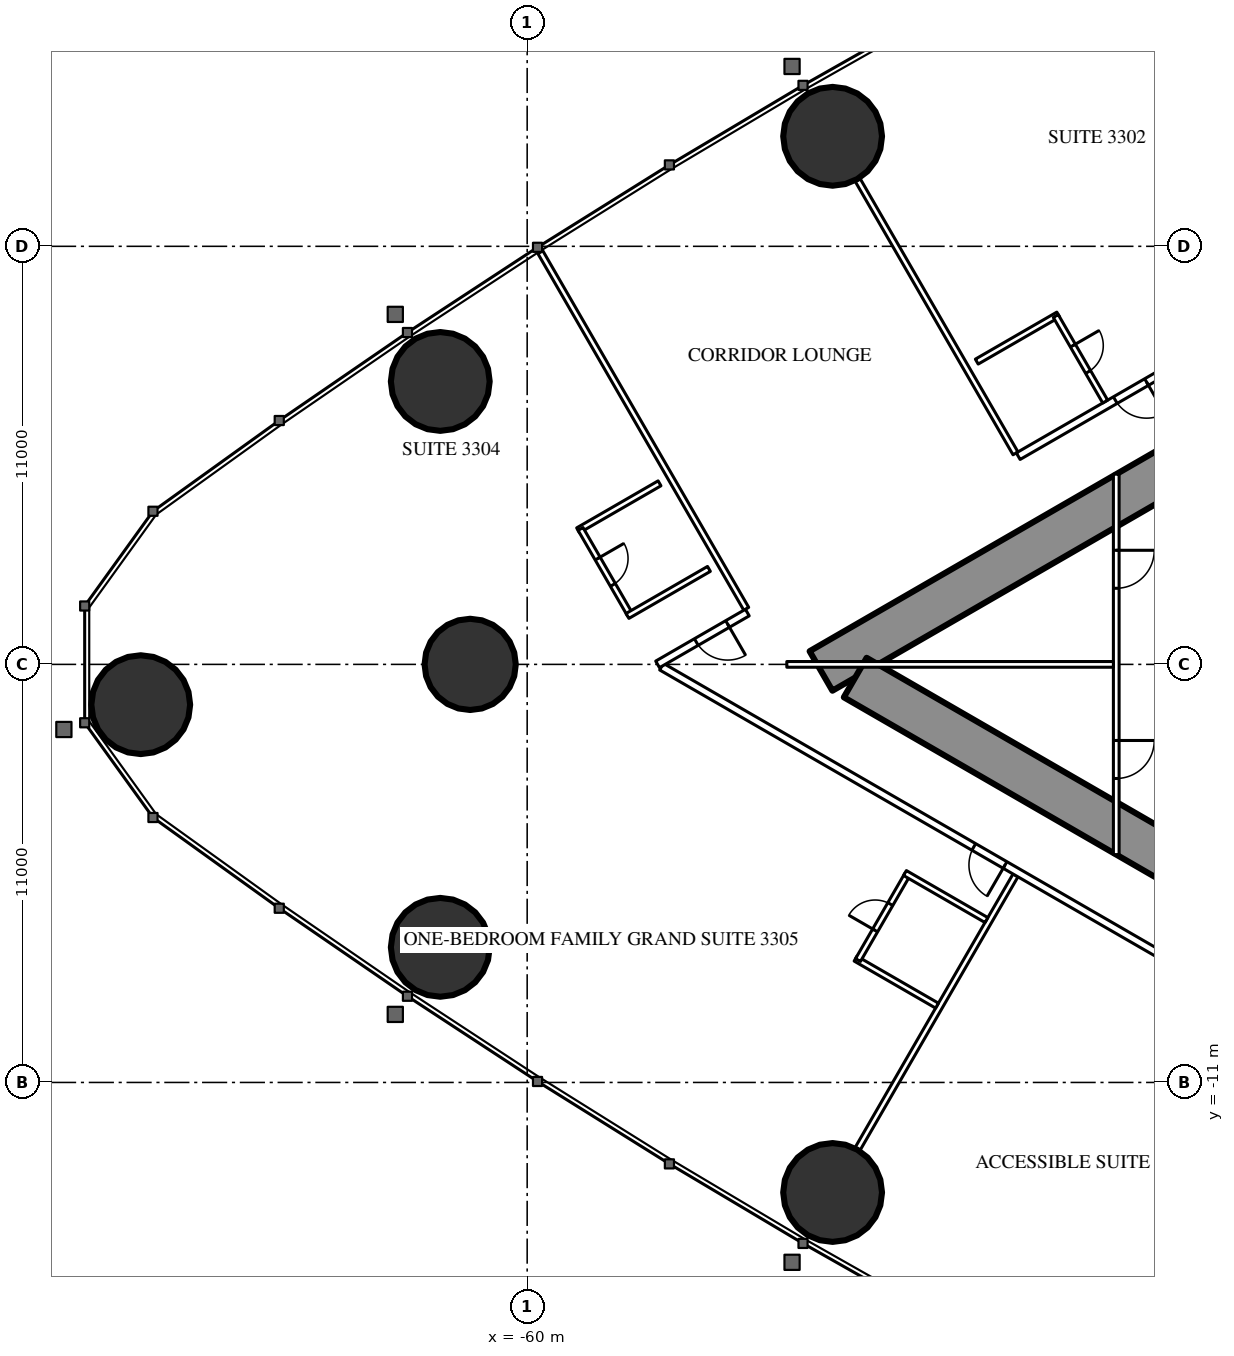
"""IFC4 building model, lengths in metres.
Left out: names, types, materials, properties, quantities, classifications, styles, units other than length and angle.
Written with IfcOpenShell. Run it as: python <this file> out.ifc"""

import sys

from ifc_helpers import new_model, si_unit, direction, frame, frame_2d, origin, origin_2d, place, context, subcontext, project, spatial, rectangle, circle, hollow_circle, extrude, element, fill, save


model = new_model("IFC4")
c1 = context("Model", 3, precision=1e-05, world=origin(), true_north=direction((0.0, 1.0)))
c2 = subcontext(c1, "Body", "Model", "MODEL_VIEW")
j1 = project(units=[si_unit("LENGTHUNIT", "METRE"), si_unit("PLANEANGLEUNIT", "RADIAN")], contexts=[c1])
p1 = place(None, origin())
s1 = spatial("IfcSite", under=j1, at=p1, CompositionType="ELEMENT")
p2 = place(p1, origin())
s2 = spatial("IfcBuilding", under=s1, at=p2, CompositionType="ELEMENT")
p3 = place(p2, frame((0.0, 0.0, 125.6)))
s3 = spatial("IfcBuildingStorey", under=s2, at=p3, CompositionType="ELEMENT", Elevation=125.6)
for number, where, z_axis, x_axis in (
    (1, (-70.168, -1.06, 0.0), (0.0, 0.0, 1.0), (1.0, 0.0, 0.0)),
    (2, (-62.287, -7.445, 0.0), (0.0, 0.0, 1.0), (1.0, 0.0, 0.0)),
    (3, (-51.963, -13.895, 0.0), (0.0, 0.0, 1.0), (1.0, 0.0, 0.0)),
    (4, (-51.963, 13.895, 0.0), (0.0, 0.0, 1.0), (1.0, 0.0, 0.0)),
    (5, (-62.287, 7.445, 0.0), (0.0, 0.0, 1.0), (1.0, 0.0, 0.0)),
):
    element("IfcColumn", number, at=place(p3, frame(where, z_axis=z_axis, x_axis=x_axis)), inside=s3, PredefinedType="COLUMN", context=c2, shape_type="SweptSolid", body=[
        extrude(hollow_circle(Radius=1.3, WallThickness=0.1, at=origin_2d()), origin(), (0.0, 0.0, 1.0), 3.5),
    ])
p4 = place(p3, frame((-61.5, 0.0, 0.0), z_axis=(0.0, 0.0, 1.0), x_axis=(1.0, 0.0, 0.0)))
e6 = element("IfcColumn", 6, at=p4, inside=s3, PredefinedType="COLUMN", context=c2, shape_type="SweptSolid", body=[
    extrude(circle(Radius=1.2, at=origin_2d()), origin(), (0.0, 0.0, 1.0), 3.5),
])
p5 = place(p3, frame((-27.2, 14.3, 0.0), z_axis=(0.0, 0.0, 1.0), x_axis=(-0.866026593062, -0.499997940104, 0.0)))
e7 = element("IfcWall", 7, at=p5, inside=s3, PredefinedType="SHEAR", context=c2, shape_type="SweptSolid", body=[
    extrude(rectangle(XDim=28.946, YDim=1.2, at=frame_2d((14.473, 0.0))), origin(), (0.0, 0.0, 1.0), 3.5),
])
p6 = place(p5, frame((4.6, 0.0, 0.0)))
e8 = element("IfcOpeningElement", 8, at=p6, cuts=e7, PredefinedType="OPENING", context=c2, shape_type="SweptSolid", body=[
    extrude(rectangle(XDim=1.0, YDim=2.2, at=frame_2d((0.5, 1.1))), frame((0.0, 0.61, 0.0), z_axis=(0.0, -1.0, 0.0), x_axis=(1.0, 0.0, 0.0)), (0.0, 0.0, 1.0), 1.22),
])
p7 = place(p5, frame((13.395, 0.0, 0.0)))
e9 = element("IfcOpeningElement", 9, at=p7, cuts=e7, PredefinedType="OPENING", context=c2, shape_type="SweptSolid", body=[
    extrude(rectangle(XDim=1.8, YDim=2.2, at=frame_2d((0.9, 1.1))), frame((0.0, 0.61, 0.0), z_axis=(0.0, -1.0, 0.0), x_axis=(1.0, 0.0, 0.0)), (0.0, 0.0, 1.0), 1.22),
])
p8 = place(p3, frame((-27.2, -14.3, 0.0), z_axis=(0.0, 0.0, 1.0), x_axis=(-0.866024021859, 0.500002393557, 0.0)))
e10 = element("IfcWall", 10, at=p8, inside=s3, PredefinedType="SHEAR", context=c2, shape_type="SweptSolid", body=[
    extrude(rectangle(XDim=27.907, YDim=1.2, at=frame_2d((13.954, 0.0))), origin(), (0.0, 0.0, 1.0), 3.5),
])
p9 = place(p8, frame((4.6, 0.0, 0.0)))
e11 = element("IfcOpeningElement", 11, at=p9, cuts=e10, PredefinedType="OPENING", context=c2, shape_type="SweptSolid", body=[
    extrude(rectangle(XDim=1.0, YDim=2.2, at=frame_2d((0.5, 1.1))), frame((0.0, 0.61, 0.0), z_axis=(0.0, -1.0, 0.0), x_axis=(1.0, 0.0, 0.0)), (0.0, 0.0, 1.0), 1.22),
])
p10 = place(p8, frame((13.395, 0.0, 0.0)))
e12 = element("IfcOpeningElement", 12, at=p10, cuts=e10, PredefinedType="OPENING", context=c2, shape_type="SweptSolid", body=[
    extrude(rectangle(XDim=1.8, YDim=2.2, at=frame_2d((0.9, 1.1))), frame((0.0, 0.61, 0.0), z_axis=(0.0, -1.0, 0.0), x_axis=(1.0, 0.0, 0.0)), (0.0, 0.0, 1.0), 1.22),
])
p11 = place(p3, frame((-47.151, 5.552, 0.0), z_axis=(0.0, 0.0, 1.0), x_axis=(-0.500003012045, 0.866023664773, 0.0)))
e13 = element("IfcWall", 13, at=p11, inside=s3, PredefinedType="PARTITIONING", context=c2, shape_type="SweptSolid", body=[
    extrude(rectangle(XDim=8.311, YDim=0.15, at=frame_2d((4.156, 0.0))), origin(), (0.0, 0.0, 1.0), 2.2),
])
p12 = place(p3, frame((-54.236, 1.462, 0.0), z_axis=(0.0, 0.0, 1.0), x_axis=(-0.499990351854, 0.866030974073, 0.0)))
e14 = element("IfcWall", 14, at=p12, inside=s3, PredefinedType="PARTITIONING", context=c2, shape_type="SweptSolid", body=[
    extrude(rectangle(XDim=10.834, YDim=0.15, at=frame_2d((5.417, 0.0))), origin(), (0.0, 0.0, 1.0), 3.25),
])
p13 = place(p3, frame((-47.151, -5.552, 0.0), z_axis=(0.0, 0.0, 1.0), x_axis=(-0.500003012045, -0.866023664773, 0.0)))
e15 = element("IfcWall", 15, at=p13, inside=s3, PredefinedType="PARTITIONING", context=c2, shape_type="SweptSolid", body=[
    extrude(rectangle(XDim=8.311, YDim=0.15, at=frame_2d((4.156, 0.0))), origin(), (0.0, 0.0, 1.0), 2.2),
])
p14 = place(p3, frame((-36.92, -11.344, 0.0), z_axis=(0.0, 0.0, 1.0), x_axis=(-0.866028313256, 0.499994960614, 0.0)))
e16 = element("IfcWall", 16, at=p14, inside=s3, PredefinedType="PARTITIONING", context=c2, shape_type="SweptSolid", body=[
    extrude(rectangle(XDim=22.568, YDim=0.2, at=frame_2d((11.284, 0.0))), origin(), (0.0, 0.0, 1.0), 3.25),
])
p15 = place(p14, frame((12.131, 0.0, 0.0)))
e17 = element("IfcOpeningElement", 17, at=p15, cuts=e16, PredefinedType="OPENING", context=c2, shape_type="SweptSolid", body=[
    extrude(rectangle(XDim=0.95, YDim=2.2, at=frame_2d((0.475, 1.1))), frame((0.0, 0.11, 0.0), z_axis=(0.0, -1.0, 0.0), x_axis=(1.0, 0.0, 0.0)), (0.0, 0.0, 1.0), 0.22),
])
p16 = place(p14, frame((3.35, 0.0, 0.0)))
e18 = element("IfcOpeningElement", 18, at=p16, cuts=e16, PredefinedType="OPENING", context=c2, shape_type="SweptSolid", body=[
    extrude(rectangle(XDim=1.0, YDim=2.2, at=frame_2d((0.5, 1.1))), frame((0.0, 0.11, 0.0), z_axis=(0.0, -1.0, 0.0), x_axis=(1.0, 0.0, 0.0)), (0.0, 0.0, 1.0), 0.22),
])
p17 = place(p3, frame((-37.7, 10.894, 0.0), z_axis=(0.0, 0.0, 1.0), x_axis=(-0.866027551079, -0.499996280759, 0.0)))
e19 = element("IfcWall", 19, at=p17, inside=s3, PredefinedType="PARTITIONING", context=c2, shape_type="SweptSolid", body=[
    extrude(rectangle(XDim=10.831, YDim=0.2, at=frame_2d((5.415, 0.0))), origin(), (0.0, 0.0, 1.0), 3.25),
])
p18 = place(p17, frame((6.93, 0.0, 0.0)))
e20 = element("IfcOpeningElement", 20, at=p18, cuts=e19, PredefinedType="OPENING", context=c2, shape_type="SweptSolid", body=[
    extrude(rectangle(XDim=0.95, YDim=2.2, at=frame_2d((0.475, 1.1))), frame((0.0, 0.11, 0.0), z_axis=(0.0, -1.0, 0.0), x_axis=(1.0, 0.0, 0.0)), (0.0, 0.0, 1.0), 0.22),
])
p19 = place(p3, frame((-54.207, 1.363, 0.0), z_axis=(0.0, 0.0, 1.0), x_axis=(-0.866046902845, -0.499962760685, 0.0)))
e21 = element("IfcWall", 21, at=p19, inside=s3, PredefinedType="PARTITIONING", context=c2, shape_type="SweptSolid", body=[
    extrude(rectangle(XDim=2.726, YDim=0.2, at=frame_2d((1.363, 0.0))), origin(), (0.0, 0.0, 1.0), 3.25),
])
p20 = place(p19, frame((0.6, 0.0, 0.0)))
e22 = element("IfcOpeningElement", 22, at=p20, cuts=e21, PredefinedType="OPENING", context=c2, shape_type="SweptSolid", body=[
    extrude(rectangle(XDim=0.95, YDim=2.2, at=frame_2d((0.475, 1.1))), frame((0.0, 0.11, 0.0), z_axis=(0.0, -1.0, 0.0), x_axis=(1.0, 0.0, 0.0)), (0.0, 0.0, 1.0), 0.22),
])
p21 = place(p3, frame((-56.517, 4.764, 0.0), z_axis=(0.0, 0.0, 1.0), x_axis=(-0.866031185235, -0.4999899861, 0.0)))
e23 = element("IfcWall", 23, at=p21, inside=s3, PredefinedType="PARTITIONING", context=c2, shape_type="SweptSolid", body=[
    extrude(rectangle(XDim=2.475, YDim=0.15, at=frame_2d((1.238, 0.0))), origin(), (0.0, 0.0, 1.0), 3.25),
])
p22 = place(p3, frame((-57.296, 1.312, 0.0), z_axis=(0.0, 0.0, 1.0), x_axis=(-0.49997716683, 0.86603858612, 0.0)))
e24 = element("IfcWall", 24, at=p22, inside=s3, PredefinedType="PARTITIONING", context=c2, shape_type="SweptSolid", body=[
    extrude(rectangle(XDim=2.6, YDim=0.15, at=frame_2d((1.3, 0.0))), origin(), (0.0, 0.0, 1.0), 3.25),
])
p23 = place(p22, frame((0.9, 0.0, 0.0)))
e25 = element("IfcOpeningElement", 25, at=p23, cuts=e24, PredefinedType="OPENING", context=c2, shape_type="SweptSolid", body=[
    extrude(rectangle(XDim=0.8, YDim=2.2, at=frame_2d((0.4, 1.1))), frame((0.0, 0.085, 0.0), z_axis=(0.0, -1.0, 0.0), x_axis=(1.0, 0.0, 0.0)), (0.0, 0.0, 1.0), 0.17),
])
for number, where, z_axis, x_axis in (
    (26, (-55.217, 2.512, 0.0), (0.0, 0.0, 1.0), (-0.866, -0.5, 0.0)),
    (27, (-49.216, -8.979, 0.0), (0.0, 0.0, 1.0), (-0.866, 0.5, 0.0)),
):
    element("IfcWall", number, at=place(p3, frame(where, z_axis=z_axis, x_axis=x_axis)), inside=s3, PredefinedType="PARTITIONING", context=c2, shape_type="SweptSolid", body=[
        extrude(rectangle(XDim=2.475, YDim=0.15, at=frame_2d((1.238, 0.0))), origin(), (0.0, 0.0, 1.0), 3.25),
    ])
p24 = place(p3, frame((-49.995, -5.527, 0.0), z_axis=(0.0, 0.0, 1.0), x_axis=(-0.500006934395, -0.866021400173, 0.0)))
e28 = element("IfcWall", 28, at=p24, inside=s3, PredefinedType="PARTITIONING", context=c2, shape_type="SweptSolid", body=[
    extrude(rectangle(XDim=2.6, YDim=0.15, at=frame_2d((1.3, 0.0))), origin(), (0.0, 0.0, 1.0), 3.25),
])
p25 = place(p24, frame((0.9, 0.0, 0.0)))
e29 = element("IfcOpeningElement", 29, at=p25, cuts=e28, PredefinedType="OPENING", context=c2, shape_type="SweptSolid", body=[
    extrude(rectangle(XDim=0.8, YDim=2.2, at=frame_2d((0.4, 1.1))), frame((0.0, 0.085, 0.0), z_axis=(0.0, -1.0, 0.0), x_axis=(1.0, 0.0, 0.0)), (0.0, 0.0, 1.0), 0.17),
])
p26 = place(p3, frame((-47.916, -6.727, 0.0), z_axis=(0.0, 0.0, 1.0), x_axis=(-0.866031185235, 0.4999899861, 0.0)))
e30 = element("IfcWall", 30, at=p26, inside=s3, PredefinedType="PARTITIONING", context=c2, shape_type="SweptSolid", body=[
    extrude(rectangle(XDim=2.475, YDim=0.15, at=frame_2d((1.238, 0.0))), origin(), (0.0, 0.0, 1.0), 3.25),
])
p27 = place(p3, frame((-46.026, 9.204, 0.0), z_axis=(0.0, 0.0, 1.0), x_axis=(-0.866006523861, -0.500032699561, 0.0)))
e31 = element("IfcWall", 31, at=p27, inside=s3, PredefinedType="PARTITIONING", context=c2, shape_type="SweptSolid", body=[
    extrude(rectangle(XDim=2.475, YDim=0.15, at=frame_2d((1.237, 0.0))), origin(), (0.0, 0.0, 1.0), 3.25),
])
p28 = place(p3, frame((-44.791, 6.915, 0.0), z_axis=(0.0, 0.0, 1.0), x_axis=(-0.500047596559, 0.865997922154, 0.0)))
e32 = element("IfcWall", 32, at=p28, inside=s3, PredefinedType="PARTITIONING", context=c2, shape_type="SweptSolid", body=[
    extrude(rectangle(XDim=2.6, YDim=0.15, at=frame_2d((1.3, 0.0))), origin(), (0.0, 0.0, 1.0), 3.25),
])
p29 = place(p28, frame((0.9, 0.0, 0.0)))
e33 = element("IfcOpeningElement", 33, at=p29, cuts=e32, PredefinedType="OPENING", context=c2, shape_type="SweptSolid", body=[
    extrude(rectangle(XDim=0.8, YDim=2.2, at=frame_2d((0.4, 1.1))), frame((0.0, 0.085, 0.0), z_axis=(0.0, -1.0, 0.0), x_axis=(1.0, 0.0, 0.0)), (0.0, 0.0, 1.0), 0.17),
])
p30 = place(p3, frame((-44.5, 5.005, 0.0), z_axis=(0.0, 0.0, 1.0), x_axis=(0.0, -1.0, 0.0)))
e34 = element("IfcWall", 34, at=p30, inside=s3, PredefinedType="PARTITIONING", context=c2, shape_type="SweptSolid", body=[
    extrude(rectangle(XDim=10.009, YDim=0.15, at=frame_2d((5.005, 0.0))), origin(), (0.0, 0.0, 1.0), 2.45),
])
p31 = place(p30, frame((2.002, 0.0, 0.0)))
e35 = element("IfcOpeningElement", 35, at=p31, cuts=e34, PredefinedType="OPENING", context=c2, shape_type="SweptSolid", body=[
    extrude(rectangle(XDim=1.0, YDim=2.2, at=frame_2d((0.5, 1.1))), frame((0.0, 0.085, 0.0), z_axis=(0.0, -1.0, 0.0), x_axis=(1.0, 0.0, 0.0)), (0.0, 0.0, 1.0), 0.17),
])
p32 = place(p30, frame((7.007, 0.0, 0.0)))
e36 = element("IfcOpeningElement", 36, at=p32, cuts=e34, PredefinedType="OPENING", context=c2, shape_type="SweptSolid", body=[
    extrude(rectangle(XDim=1.0, YDim=2.2, at=frame_2d((0.5, 1.1))), frame((0.0, 0.085, 0.0), z_axis=(0.0, -1.0, 0.0), x_axis=(1.0, 0.0, 0.0)), (0.0, 0.0, 1.0), 0.17),
])
p33 = place(p3, frame((-44.575, 0.0, 0.0), z_axis=(0.0, 0.0, 1.0), x_axis=(-1.0, 0.0, 0.0)))
e37 = element("IfcWall", 37, at=p33, inside=s3, PredefinedType="PARTITIONING", context=c2, shape_type="SweptSolid", body=[
    extrude(rectangle(XDim=8.593, YDim=0.15, at=frame_2d((4.297, 0.0))), origin(), (0.0, 0.0, 1.0), 2.2),
])
p34 = place(p23, origin())
e38 = element("IfcDoor", 38, at=p34, inside=s3, OperationType="SINGLE_SWING_RIGHT", PredefinedType="DOOR", context=c2, shape_type="SweptSolid", body=[
    extrude(rectangle(XDim=0.8, YDim=2.2, at=frame_2d((0.4, 1.1))), frame((0.0, 0.025, 0.0), z_axis=(0.0, -1.0, 0.0), x_axis=(1.0, 0.0, 0.0)), (0.0, 0.0, 1.0), 0.05),
])
fill(e25, e38)
p35 = place(p20, origin())
e39 = element("IfcDoor", 39, at=p35, inside=s3, OperationType="SINGLE_SWING_LEFT", PredefinedType="DOOR", context=c2, shape_type="SweptSolid", body=[
    extrude(rectangle(XDim=0.95, YDim=2.2, at=frame_2d((0.475, 1.1))), frame((0.0, 0.025, 0.0), z_axis=(0.0, -1.0, 0.0), x_axis=(1.0, 0.0, 0.0)), (0.0, 0.0, 1.0), 0.05),
])
fill(e22, e39)
p36 = place(p25, origin())
e40 = element("IfcDoor", 40, at=p36, inside=s3, OperationType="SINGLE_SWING_RIGHT", PredefinedType="DOOR", context=c2, shape_type="SweptSolid", body=[
    extrude(rectangle(XDim=0.8, YDim=2.2, at=frame_2d((0.4, 1.1))), frame((0.0, 0.025, 0.0), z_axis=(0.0, -1.0, 0.0), x_axis=(1.0, 0.0, 0.0)), (0.0, 0.0, 1.0), 0.05),
])
fill(e29, e40)
p37 = place(p15, origin())
e41 = element("IfcDoor", 41, at=p37, inside=s3, OperationType="SINGLE_SWING_LEFT", PredefinedType="DOOR", context=c2, shape_type="SweptSolid", body=[
    extrude(rectangle(XDim=0.95, YDim=2.2, at=frame_2d((0.475, 1.1))), frame((0.0, 0.025, 0.0), z_axis=(0.0, -1.0, 0.0), x_axis=(1.0, 0.0, 0.0)), (0.0, 0.0, 1.0), 0.05),
])
fill(e17, e41)
p38 = place(p29, origin())
e42 = element("IfcDoor", 42, at=p38, inside=s3, OperationType="SINGLE_SWING_RIGHT", PredefinedType="DOOR", context=c2, shape_type="SweptSolid", body=[
    extrude(rectangle(XDim=0.8, YDim=2.2, at=frame_2d((0.4, 1.1))), frame((0.0, 0.025, 0.0), z_axis=(0.0, -1.0, 0.0), x_axis=(1.0, 0.0, 0.0)), (0.0, 0.0, 1.0), 0.05),
])
fill(e33, e42)
p39 = place(p18, origin())
e43 = element("IfcDoor", 43, at=p39, inside=s3, OperationType="SINGLE_SWING_LEFT", PredefinedType="DOOR", context=c2, shape_type="SweptSolid", body=[
    extrude(rectangle(XDim=0.95, YDim=2.2, at=frame_2d((0.475, 1.1))), frame((0.0, 0.025, 0.0), z_axis=(0.0, -1.0, 0.0), x_axis=(1.0, 0.0, 0.0)), (0.0, 0.0, 1.0), 0.05),
])
fill(e20, e43)
p40 = place(p31, origin())
e44 = element("IfcDoor", 44, at=p40, inside=s3, OperationType="SINGLE_SWING_LEFT", PredefinedType="DOOR", context=c2, shape_type="SweptSolid", body=[
    extrude(rectangle(XDim=1.0, YDim=2.2, at=frame_2d((0.5, 1.1))), frame((0.0, 0.025, 0.0), z_axis=(0.0, -1.0, 0.0), x_axis=(1.0, 0.0, 0.0)), (0.0, 0.0, 1.0), 0.05),
])
fill(e35, e44)
p41 = place(p32, origin())
e45 = element("IfcDoor", 45, at=p41, inside=s3, OperationType="SINGLE_SWING_LEFT", PredefinedType="DOOR", context=c2, shape_type="SweptSolid", body=[
    extrude(rectangle(XDim=1.0, YDim=2.2, at=frame_2d((0.5, 1.1))), frame((0.0, 0.025, 0.0), z_axis=(0.0, -1.0, 0.0), x_axis=(1.0, 0.0, 0.0)), (0.0, 0.0, 1.0), 0.05),
])
fill(e36, e45)
save(model, sys.argv[1])
